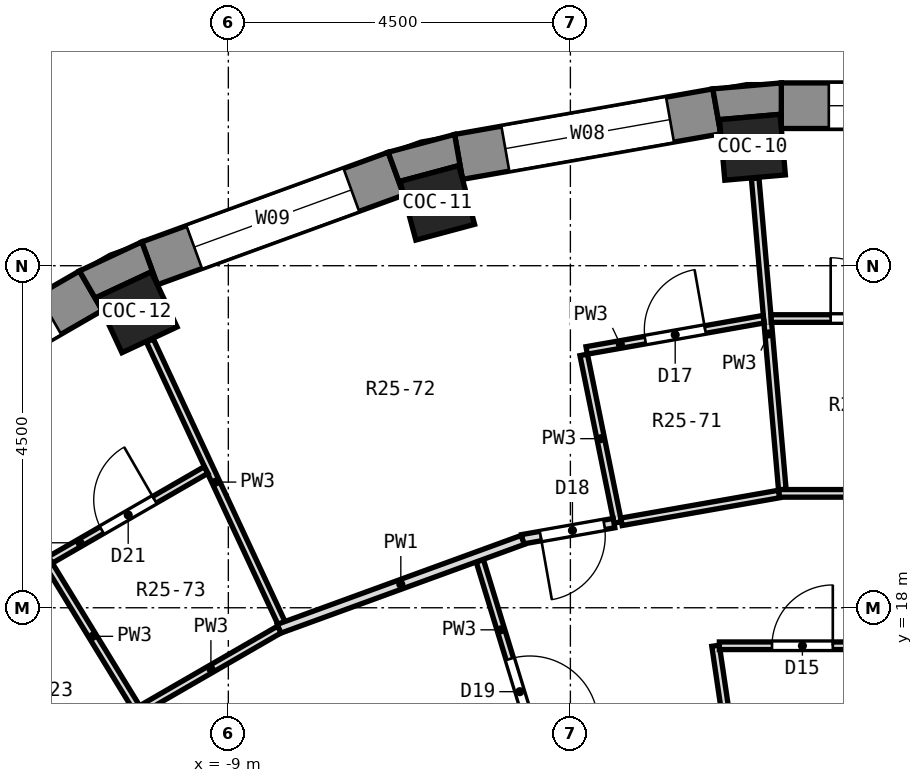
"""IFC4 building model, lengths in metres.
Left out: names, types, materials, properties, quantities, classifications, styles, units other than length and angle.
Written with IfcOpenShell. Run it as: python <this file> out.ifc"""

import sys

from ifc_helpers import new_model, si_unit, direction, frame, frame_2d, origin, origin_2d, place, context, subcontext, project, spatial, polyline, rectangle, outline, extrude, element, fill, save


model = new_model("IFC4")
c1 = context("Model", 3, precision=1e-05, world=origin(), true_north=direction((0.0, 1.0)))
c2 = subcontext(c1, "Body", "Model", "MODEL_VIEW")
j1 = project(units=[si_unit("LENGTHUNIT", "METRE"), si_unit("PLANEANGLEUNIT", "RADIAN")], contexts=[c1])
p1 = place(None, origin())
s1 = spatial("IfcSite", under=j1, at=p1, CompositionType="ELEMENT")
p2 = place(p1, origin())
s2 = spatial("IfcBuilding", under=s1, at=p2, CompositionType="ELEMENT")
p3 = place(p2, frame((0.0, 0.0, 160.8)))
s3 = spatial("IfcBuildingStorey", under=s2, at=p3, CompositionType="ELEMENT", Elevation=160.8)
for number, where, z_axis, x_axis in (
    (1, (-2.105, 24.058, 0.0), (0.0, 0.0, 1.0), (-0.087, 0.996, 0.0)),
    (2, (-6.25, 23.327, 0.0), (0.0, 0.0, 1.0), (-0.259, 0.966, 0.0)),
    (3, (-10.206, 21.887, 0.0), (0.0, 0.0, 1.0), (-0.423, 0.906, 0.0)),
):
    element("IfcColumn", number, at=place(p3, frame(where, z_axis=z_axis, x_axis=x_axis)), inside=s3, PredefinedType="COLUMN", context=c2, shape_type="SweptSolid", body=[
        extrude(rectangle(XDim=0.8, YDim=0.8, at=origin_2d()), origin(), (0.0, 0.0, 1.0), 3.3),
    ])
p4 = place(p3, frame((1.725, 24.605, 0.0), z_axis=(0.0, 0.0, 1.0), x_axis=(-1.0, 0.0, 0.0)))
e4 = element("IfcWall", 4, at=p4, inside=s3, PredefinedType="SOLIDWALL", context=c2, shape_type="SweptSolid", body=[
    extrude(rectangle(XDim=3.45, YDim=0.6, at=frame_2d((1.725, 0.0))), origin(), (0.0, 0.0, 1.0), 2.85),
])
p5 = place(p4, frame((0.625, 0.0, 0.9)))
e5 = element("IfcOpeningElement", 5, at=p5, cuts=e4, PredefinedType="OPENING", context=c2, shape_type="SweptSolid", body=[
    extrude(rectangle(XDim=2.2, YDim=1.8, at=frame_2d((1.1, 0.9))), frame((0.0, 0.312, 0.0), z_axis=(0.0, -1.0, 0.0), x_axis=(1.0, 0.0, 0.0)), (0.0, 0.0, 1.0), 0.624),
])
p6 = place(p3, frame((-2.574, 24.531, 0.0), z_axis=(0.0, 0.0, 1.0), x_axis=(-0.984814892183, -0.173607684551, 0.0)))
e6 = element("IfcWall", 6, at=p6, inside=s3, PredefinedType="SOLIDWALL", context=c2, shape_type="SweptSolid", body=[
    extrude(rectangle(XDim=3.45, YDim=0.6, at=frame_2d((1.725, 0.0))), origin(), (0.0, 0.0, 1.0), 2.85),
])
p7 = place(p6, frame((0.625, 0.0, 0.9)))
e7 = element("IfcOpeningElement", 7, at=p7, cuts=e6, PredefinedType="OPENING", context=c2, shape_type="SweptSolid", body=[
    extrude(rectangle(XDim=2.2, YDim=1.8, at=frame_2d((1.1, 0.9))), frame((0.0, 0.312, 0.0), z_axis=(0.0, -1.0, 0.0), x_axis=(1.0, 0.0, 0.0)), (0.0, 0.0, 1.0), 0.624),
])
p8 = place(p3, frame((-6.794, 23.711, 0.0), z_axis=(0.0, 0.0, 1.0), x_axis=(-0.93968799822, -0.342032843455, 0.0)))
e8 = element("IfcWall", 8, at=p8, inside=s3, PredefinedType="SOLIDWALL", context=c2, shape_type="SweptSolid", body=[
    extrude(rectangle(XDim=3.45, YDim=0.6, at=frame_2d((1.725, 0.0))), origin(), (0.0, 0.0, 1.0), 2.85),
])
p9 = place(p8, frame((0.625, 0.0, 0.9)))
e9 = element("IfcOpeningElement", 9, at=p9, cuts=e8, PredefinedType="OPENING", context=c2, shape_type="SweptSolid", body=[
    extrude(rectangle(XDim=2.2, YDim=1.8, at=frame_2d((1.1, 0.9))), frame((0.0, 0.312, 0.0), z_axis=(0.0, -1.0, 0.0), x_axis=(1.0, 0.0, 0.0)), (0.0, 0.0, 1.0), 0.624),
])
p10 = place(p3, frame((-10.809, 22.171, 0.0), z_axis=(0.0, 0.0, 1.0), x_axis=(-0.86602648383, -0.499998129301, 0.0)))
e10 = element("IfcWall", 10, at=p10, inside=s3, PredefinedType="SOLIDWALL", context=c2, shape_type="SweptSolid", body=[
    extrude(rectangle(XDim=3.45, YDim=0.6, at=frame_2d((1.725, 0.0))), origin(), (0.0, 0.0, 1.0), 2.85),
])
p11 = place(p10, frame((0.625, 0.0, 0.9)))
e11 = element("IfcOpeningElement", 11, at=p11, cuts=e10, PredefinedType="OPENING", context=c2, shape_type="SweptSolid", body=[
    extrude(rectangle(XDim=2.2, YDim=1.8, at=frame_2d((1.1, 0.9))), frame((0.0, 0.312, 0.0), z_axis=(0.0, -1.0, 0.0), x_axis=(1.0, 0.0, 0.0)), (0.0, 0.0, 1.0), 0.624),
])
p12 = place(p3, origin())
e12 = element("IfcWall", 12, at=p12, inside=s3, PredefinedType="SOLIDWALL", context=c2, shape_type="SweptSolid", body=[
    extrude(outline(polyline([(-1.725, 24.905), (-2.626, 24.826), (-2.522, 24.235), (-2.538, 24.422), (-1.741, 24.491), (-1.725, 24.305), (-1.725, 24.905)])), origin(), (0.0, 0.0, 1.0), 2.85),
])
p13 = place(p3, origin())
e13 = element("IfcWall", 13, at=p13, inside=s3, PredefinedType="SOLIDWALL", context=c2, shape_type="SweptSolid", body=[
    extrude(outline(polyline([(-6.023, 24.227), (-6.897, 23.993), (-6.692, 23.429), (-6.74, 23.61), (-5.968, 23.817), (-5.919, 23.636), (-6.023, 24.227)])), origin(), (0.0, 0.0, 1.0), 2.85),
])
p14 = place(p3, origin())
e14 = element("IfcWall", 14, at=p14, inside=s3, PredefinedType="SOLIDWALL", context=c2, shape_type="SweptSolid", body=[
    extrude(outline(polyline([(-10.959, 22.431), (-10.659, 21.911), (-10.738, 22.081), (-10.013, 22.419), (-9.934, 22.249), (-10.139, 22.813), (-10.959, 22.431)])), origin(), (0.0, 0.0, 1.0), 2.85),
])
p15 = place(p3, frame((-2.069, 23.65, 0.0), z_axis=(0.0, 0.0, 1.0), x_axis=(0.086893599578, -0.996217597893, 0.0)))
e15 = element("IfcWall", 15, at=p15, inside=s3, PredefinedType="PARTITIONING", context=c2, shape_type="SweptSolid", body=[
    extrude(rectangle(XDim=4.111, YDim=0.1, at=frame_2d((2.055, 0.0))), origin(), (0.0, 0.0, 1.0), 2.85),
])
p16 = place(p3, frame((-2.59, 17.5, 0.0), z_axis=(0.0, 0.0, 1.0), x_axis=(0.146578722253, -0.989199008381, 0.0)))
e16 = element("IfcWall", 16, at=p16, inside=s3, PredefinedType="PARTITIONING", context=c2, shape_type="SweptSolid", body=[
    extrude(rectangle(XDim=2.06, YDim=0.1, at=frame_2d((1.03, 0.0))), origin(), (0.0, 0.0, 1.0), 2.85),
])
p17 = place(p3, frame((-4.325, 21.327, 0.0), z_axis=(0.0, 0.0, 1.0), x_axis=(0.199120171805, -0.979975079877, 0.0)))
e17 = element("IfcWall", 17, at=p17, inside=s3, PredefinedType="PARTITIONING", context=c2, shape_type="SweptSolid", body=[
    extrude(rectangle(XDim=2.25, YDim=0.1, at=frame_2d((1.125, 0.0))), origin(), (0.0, 0.0, 1.0), 2.85),
])
p18 = place(p3, frame((-5.692, 18.618, 0.0), z_axis=(0.0, 0.0, 1.0), x_axis=(0.292189255633, -0.956360517218, 0.0)))
e18 = element("IfcWall", 18, at=p18, inside=s3, PredefinedType="PARTITIONING", context=c2, shape_type="SweptSolid", body=[
    extrude(rectangle(XDim=3.601, YDim=0.1, at=frame_2d((1.801, 0.0))), origin(), (0.0, 0.0, 1.0), 2.85),
])
p19 = place(p18, frame((1.351, 0.0, 0.0)))
e19 = element("IfcOpeningElement", 19, at=p19, cuts=e18, PredefinedType="OPENING", context=c2, shape_type="SweptSolid", body=[
    extrude(rectangle(XDim=0.9, YDim=2.1, at=frame_2d((0.45, 1.05))), frame((0.0, 0.062, 0.0), z_axis=(0.0, -1.0, 0.0), x_axis=(1.0, 0.0, 0.0)), (0.0, 0.0, 1.0), 0.124),
])
p20 = place(p3, frame((-10.032, 21.516, 0.0), z_axis=(0.0, 0.0, 1.0), x_axis=(0.422407439585, -0.906406065173, 0.0)))
e20 = element("IfcWall", 20, at=p20, inside=s3, PredefinedType="PARTITIONING", context=c2, shape_type="SweptSolid", body=[
    extrude(rectangle(XDim=4.111, YDim=0.1, at=frame_2d((2.055, 0.0))), origin(), (0.0, 0.0, 1.0), 2.85),
])
p21 = place(p3, frame((-11.385, 18.605, 0.0), z_axis=(0.0, 0.0, 1.0), x_axis=(0.522076659847, -0.852898564451, 0.0)))
e21 = element("IfcWall", 21, at=p21, inside=s3, PredefinedType="PARTITIONING", context=c2, shape_type="SweptSolid", body=[
    extrude(rectangle(XDim=2.3, YDim=0.1, at=frame_2d((1.15, 0.0))), origin(), (0.0, 0.0, 1.0), 2.85),
])
p22 = place(p3, frame((-13.617, 19.447, 0.0), z_axis=(0.0, 0.0, 1.0), x_axis=(0.573631652668, -0.819113378634, 0.0)))
e22 = element("IfcWall", 22, at=p22, inside=s3, PredefinedType="PARTITIONING", context=c2, shape_type="SweptSolid", body=[
    extrude(rectangle(XDim=4.161, YDim=0.1, at=frame_2d((2.081, 0.0))), origin(), (0.0, 0.0, 1.0), 2.85),
])
p23 = place(p3, frame((-2.54, 17.5, 0.0), z_axis=(0.0, 0.0, 1.0), x_axis=(1.0, 0.0, 0.0)))
e23 = element("IfcWall", 23, at=p23, inside=s3, PredefinedType="PARTITIONING", context=c2, shape_type="SweptSolid", body=[
    extrude(rectangle(XDim=2.185, YDim=0.1, at=frame_2d((1.093, 0.0))), origin(), (0.0, 0.0, 1.0), 2.85),
])
p24 = place(p23, frame((0.692, 0.0, 0.0)))
e24 = element("IfcOpeningElement", 24, at=p24, cuts=e23, PredefinedType="OPENING", context=c2, shape_type="SweptSolid", body=[
    extrude(rectangle(XDim=0.8, YDim=2.1, at=frame_2d((0.4, 1.05))), frame((0.0, 0.062, 0.0), z_axis=(0.0, -1.0, 0.0), x_axis=(1.0, 0.0, 0.0)), (0.0, 0.0, 1.0), 0.124),
])
p25 = place(p3, frame((-1.757, 19.505, 0.0), z_axis=(0.0, 0.0, 1.0), x_axis=(1.0, 0.0, 0.0)))
e25 = element("IfcWall", 25, at=p25, inside=s3, PredefinedType="PARTITIONING", context=c2, shape_type="SweptSolid", body=[
    extrude(rectangle(XDim=2.305, YDim=0.1, at=frame_2d((1.152, 0.0))), origin(), (0.0, 0.0, 1.0), 2.85),
])
p26 = place(p3, frame((-1.858, 21.805, 0.0), z_axis=(0.0, 0.0, 1.0), x_axis=(1.0, 0.0, 0.0)))
e26 = element("IfcWall", 26, at=p26, inside=s3, PredefinedType="PARTITIONING", context=c2, shape_type="SweptSolid", body=[
    extrude(rectangle(XDim=2.415, YDim=0.1, at=frame_2d((1.208, 0.0))), origin(), (0.0, 0.0, 1.0), 2.85),
])
p27 = place(p26, frame((0.782, 0.0, 0.0)))
e27 = element("IfcOpeningElement", 27, at=p27, cuts=e26, PredefinedType="OPENING", context=c2, shape_type="SweptSolid", body=[
    extrude(rectangle(XDim=0.8, YDim=2.1, at=frame_2d((0.4, 1.05))), frame((0.0, 0.062, 0.0), z_axis=(0.0, -1.0, 0.0), x_axis=(1.0, 0.0, 0.0)), (0.0, 0.0, 1.0), 0.124),
])
p28 = place(p3, frame((-3.828, 19.131, 0.0), z_axis=(0.0, 0.0, 1.0), x_axis=(0.984788229358, 0.173758865439, 0.0)))
e28 = element("IfcWall", 28, at=p28, inside=s3, PredefinedType="PARTITIONING", context=c2, shape_type="SweptSolid", body=[
    extrude(rectangle(XDim=2.105, YDim=0.1, at=frame_2d((1.052, 0.0))), origin(), (0.0, 0.0, 1.0), 2.85),
])
p29 = place(p3, frame((-5.131, 18.901, 0.0), z_axis=(0.0, 0.0, 1.0), x_axis=(0.984767477139, 0.173876438798, 0.0)))
e29 = element("IfcWall", 29, at=p29, inside=s3, PredefinedType="PARTITIONING", context=c2, shape_type="SweptSolid", body=[
    extrude(rectangle(XDim=1.223, YDim=0.125, at=frame_2d((0.611, 0.0))), origin(), (0.0, 0.0, 1.0), 2.85),
])
p30 = place(p29, frame((0.243, 0.0, 0.0)))
e30 = element("IfcOpeningElement", 30, at=p30, cuts=e29, PredefinedType="OPENING", context=c2, shape_type="SweptSolid", body=[
    extrude(rectangle(XDim=0.85, YDim=2.1, at=frame_2d((0.425, 1.05))), frame((0.0, 0.074, 0.0), z_axis=(0.0, -1.0, 0.0), x_axis=(1.0, 0.0, 0.0)), (0.0, 0.0, 1.0), 0.149),
])
p31 = place(p3, frame((-4.286, 21.385, 0.0), z_axis=(0.0, 0.0, 1.0), x_axis=(0.984765882157, 0.173885471904, 0.0)))
e31 = element("IfcWall", 31, at=p31, inside=s3, PredefinedType="PARTITIONING", context=c2, shape_type="SweptSolid", body=[
    extrude(rectangle(XDim=2.365, YDim=0.1, at=frame_2d((1.182, 0.0))), origin(), (0.0, 0.0, 1.0), 2.85),
])
p32 = place(p31, frame((0.783, 0.0, 0.0)))
e32 = element("IfcOpeningElement", 32, at=p32, cuts=e31, PredefinedType="OPENING", context=c2, shape_type="SweptSolid", body=[
    extrude(rectangle(XDim=0.8, YDim=2.1, at=frame_2d((0.4, 1.05))), frame((0.0, 0.062, 0.0), z_axis=(0.0, -1.0, 0.0), x_axis=(1.0, 0.0, 0.0)), (0.0, 0.0, 1.0), 0.124),
])
p33 = place(p3, frame((-8.335, 17.723, 0.0), z_axis=(0.0, 0.0, 1.0), x_axis=(0.939542594009, 0.342432057556, 0.0)))
e33 = element("IfcWall", 33, at=p33, inside=s3, PredefinedType="PARTITIONING", context=c2, shape_type="SweptSolid", body=[
    extrude(rectangle(XDim=3.414, YDim=0.125, at=frame_2d((1.707, 0.0))), origin(), (0.0, 0.0, 1.0), 2.85),
])
p34 = place(p3, frame((-10.13, 16.674, 0.0), z_axis=(0.0, 0.0, 1.0), x_axis=(0.866052632827, 0.499952834948, 0.0)))
e34 = element("IfcWall", 34, at=p34, inside=s3, PredefinedType="PARTITIONING", context=c2, shape_type="SweptSolid", body=[
    extrude(rectangle(XDim=2.079, YDim=0.1, at=frame_2d((1.04, 0.0))), origin(), (0.0, 0.0, 1.0), 2.85),
])
p35 = place(p3, frame((-11.342, 18.63, 0.0), z_axis=(0.0, 0.0, 1.0), x_axis=(0.866139183788, 0.49980287545, 0.0)))
e35 = element("IfcWall", 35, at=p35, inside=s3, PredefinedType="PARTITIONING", context=c2, shape_type="SweptSolid", body=[
    extrude(rectangle(XDim=2.365, YDim=0.1, at=frame_2d((1.183, 0.0))), origin(), (0.0, 0.0, 1.0), 2.85),
])
p36 = place(p35, frame((0.782, 0.0, 0.0)))
e36 = element("IfcOpeningElement", 36, at=p36, cuts=e35, PredefinedType="OPENING", context=c2, shape_type="SweptSolid", body=[
    extrude(rectangle(XDim=0.8, YDim=2.1, at=frame_2d((0.4, 1.05))), frame((0.0, 0.062, 0.0), z_axis=(0.0, -1.0, 0.0), x_axis=(1.0, 0.0, 0.0)), (0.0, 0.0, 1.0), 0.124),
])
p37 = place(p5, origin())
e37 = element("IfcWindow", 37, at=p37, inside=s3, PartitioningType="SINGLE_PANEL", PredefinedType="WINDOW", context=c2, shape_type="SweptSolid", body=[
    extrude(rectangle(XDim=2.2, YDim=1.8, at=frame_2d((1.1, 0.9))), frame((0.0, 0.18, 0.0), z_axis=(0.0, -1.0, 0.0), x_axis=(1.0, 0.0, 0.0)), (0.0, 0.0, 1.0), 0.06),
])
fill(e5, e37)
p38 = place(p7, origin())
e38 = element("IfcWindow", 38, at=p38, inside=s3, PartitioningType="SINGLE_PANEL", PredefinedType="WINDOW", context=c2, shape_type="SweptSolid", body=[
    extrude(rectangle(XDim=2.2, YDim=1.8, at=frame_2d((1.1, 0.9))), frame((0.0, 0.18, 0.0), z_axis=(0.0, -1.0, 0.0), x_axis=(1.0, 0.0, 0.0)), (0.0, 0.0, 1.0), 0.06),
])
fill(e7, e38)
p39 = place(p9, origin())
e39 = element("IfcWindow", 39, at=p39, inside=s3, PartitioningType="SINGLE_PANEL", PredefinedType="WINDOW", context=c2, shape_type="SweptSolid", body=[
    extrude(rectangle(XDim=2.2, YDim=1.8, at=frame_2d((1.1, 0.9))), frame((0.0, 0.18, 0.0), z_axis=(0.0, -1.0, 0.0), x_axis=(1.0, 0.0, 0.0)), (0.0, 0.0, 1.0), 0.06),
])
fill(e9, e39)
p40 = place(p11, origin())
e40 = element("IfcWindow", 40, at=p40, inside=s3, PartitioningType="SINGLE_PANEL", PredefinedType="WINDOW", context=c2, shape_type="SweptSolid", body=[
    extrude(rectangle(XDim=2.2, YDim=1.8, at=frame_2d((1.1, 0.9))), frame((0.0, 0.18, 0.0), z_axis=(0.0, -1.0, 0.0), x_axis=(1.0, 0.0, 0.0)), (0.0, 0.0, 1.0), 0.06),
])
fill(e11, e40)
p41 = place(p27, origin())
e41 = element("IfcDoor", 41, at=p41, inside=s3, OperationType="SINGLE_SWING_LEFT", PredefinedType="DOOR", context=c2, shape_type="SweptSolid", body=[
    extrude(rectangle(XDim=0.8, YDim=2.1, at=frame_2d((0.4, 1.05))), frame((0.0, 0.025, 0.0), z_axis=(0.0, -1.0, 0.0), x_axis=(1.0, 0.0, 0.0)), (0.0, 0.0, 1.0), 0.05),
])
fill(e27, e41)
p42 = place(p24, origin())
e42 = element("IfcDoor", 42, at=p42, inside=s3, OperationType="SINGLE_SWING_RIGHT", PredefinedType="DOOR", context=c2, shape_type="SweptSolid", body=[
    extrude(rectangle(XDim=0.8, YDim=2.1, at=frame_2d((0.4, 1.05))), frame((0.0, 0.025, 0.0), z_axis=(0.0, -1.0, 0.0), x_axis=(1.0, 0.0, 0.0)), (0.0, 0.0, 1.0), 0.05),
])
fill(e24, e42)
p43 = place(p32, origin())
e43 = element("IfcDoor", 43, at=p43, inside=s3, OperationType="SINGLE_SWING_RIGHT", PredefinedType="DOOR", context=c2, shape_type="SweptSolid", body=[
    extrude(rectangle(XDim=0.8, YDim=2.1, at=frame_2d((0.4, 1.05))), frame((0.0, 0.025, 0.0), z_axis=(0.0, -1.0, 0.0), x_axis=(1.0, 0.0, 0.0)), (0.0, 0.0, 1.0), 0.05),
])
fill(e32, e43)
p44 = place(p30, frame((0.85, 0.0, 0.0), z_axis=(0.0, 0.0, 1.0), x_axis=(-1.0, 0.0, 0.0)))
e44 = element("IfcDoor", 44, at=p44, inside=s3, OperationType="SINGLE_SWING_RIGHT", PredefinedType="DOOR", context=c2, shape_type="SweptSolid", body=[
    extrude(rectangle(XDim=0.85, YDim=2.1, at=frame_2d((0.425, 1.05))), frame((0.0, 0.025, 0.0), z_axis=(0.0, -1.0, 0.0), x_axis=(1.0, 0.0, 0.0)), (0.0, 0.0, 1.0), 0.05),
])
fill(e30, e44)
p45 = place(p19, origin())
e45 = element("IfcDoor", 45, at=p45, inside=s3, OperationType="SINGLE_SWING_RIGHT", PredefinedType="DOOR", context=c2, shape_type="SweptSolid", body=[
    extrude(rectangle(XDim=0.9, YDim=2.1, at=frame_2d((0.45, 1.05))), frame((0.0, 0.025, 0.0), z_axis=(0.0, -1.0, 0.0), x_axis=(1.0, 0.0, 0.0)), (0.0, 0.0, 1.0), 0.05),
])
fill(e19, e45)
p46 = place(p36, origin())
e46 = element("IfcDoor", 46, at=p46, inside=s3, OperationType="SINGLE_SWING_RIGHT", PredefinedType="DOOR", context=c2, shape_type="SweptSolid", body=[
    extrude(rectangle(XDim=0.8, YDim=2.1, at=frame_2d((0.4, 1.05))), frame((0.0, 0.025, 0.0), z_axis=(0.0, -1.0, 0.0), x_axis=(1.0, 0.0, 0.0)), (0.0, 0.0, 1.0), 0.05),
])
fill(e36, e46)
save(model, sys.argv[1])
